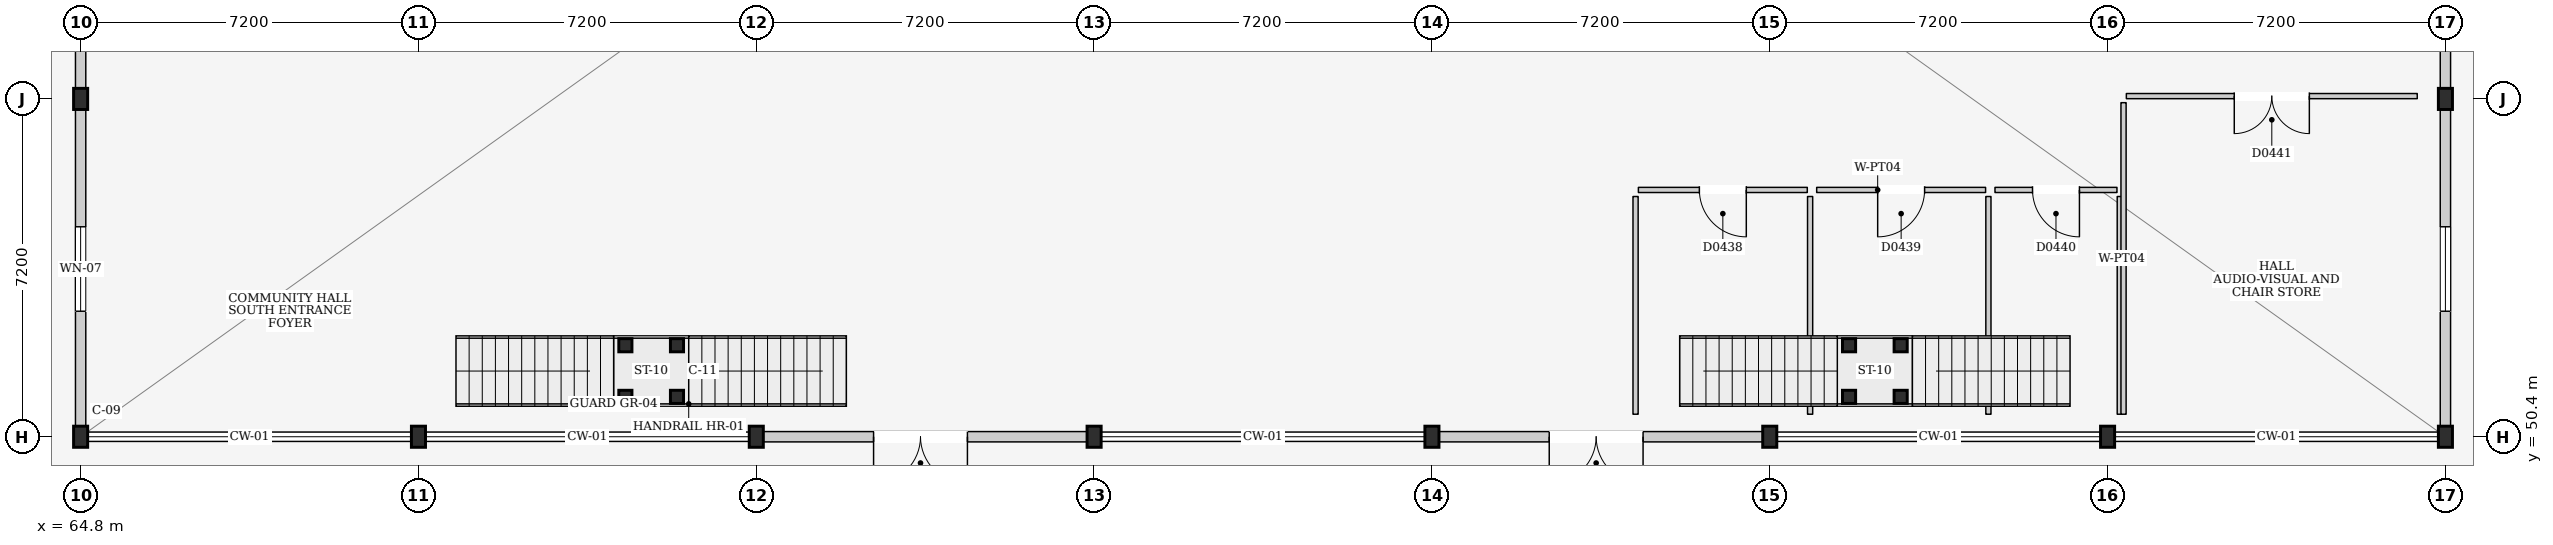
"""IFC4 building model, lengths in metres.
Left out: names, types, materials, properties, quantities, classifications, styles, units other than length and angle.
Written with IfcOpenShell. Run it as: python <this file> out.ifc"""

import sys

from ifc_helpers import new_model, si_unit, direction, frame, frame_2d, origin, origin_2d, place, context, subcontext, project, spatial, rectangle, i_section, extrude, element, fill, save


model = new_model("IFC4")
c1 = context("Model", 3, precision=1e-05, world=origin(), true_north=direction((0.0, 1.0)))
c2 = subcontext(c1, "Body", "Model", "MODEL_VIEW")
j1 = project(units=[si_unit("LENGTHUNIT", "METRE"), si_unit("PLANEANGLEUNIT", "RADIAN")], contexts=[c1])
p1 = place(None, origin())
s1 = spatial("IfcSite", under=j1, at=p1, CompositionType="ELEMENT")
p2 = place(p1, origin())
s2 = spatial("IfcBuilding", under=s1, at=p2, CompositionType="ELEMENT")
p3 = place(p2, origin())
s3 = spatial("IfcBuildingStorey", under=s2, at=p3, CompositionType="ELEMENT", Elevation=0.0)
for number, where, z_axis, x_axis in (
    (1, (64.8, 50.4, 0.0), (0.0, 0.0, 1.0), (1.0, 0.0, 0.0)),
    (2, (64.8, 57.6, 0.0), (0.0, 0.0, 1.0), (1.0, 0.0, 0.0)),
    (3, (72.0, 50.4, 0.0), (0.0, 0.0, 1.0), (1.0, 0.0, 0.0)),
    (4, (79.2, 50.4, 0.0), (0.0, 0.0, 1.0), (1.0, 0.0, 0.0)),
    (5, (86.4, 50.4, 0.0), (0.0, 0.0, 1.0), (1.0, 0.0, 0.0)),
    (6, (93.6, 50.4, 0.0), (0.0, 0.0, 1.0), (1.0, 0.0, 0.0)),
    (7, (100.8, 50.4, 0.0), (0.0, 0.0, 1.0), (1.0, 0.0, 0.0)),
    (8, (108.0, 50.4, 0.0), (0.0, 0.0, 1.0), (1.0, 0.0, 0.0)),
    (9, (115.2, 50.4, 0.0), (0.0, 0.0, 1.0), (1.0, 0.0, 0.0)),
    (10, (115.2, 57.6, 0.0), (0.0, 0.0, 1.0), (1.0, 0.0, 0.0)),
):
    element("IfcColumn", number, at=place(p3, frame(where, z_axis=z_axis, x_axis=x_axis)), inside=s3, PredefinedType="COLUMN", context=c2, shape_type="SweptSolid", body=[
        extrude(i_section(OverallWidth=0.3, OverallDepth=0.45, WebThickness=0.014, FlangeThickness=0.026, at=origin_2d()), origin(), (0.0, 0.0, 1.0), 4.5),
    ])
p4 = place(p3, frame((79.35, 50.4, 0.0), z_axis=(0.0, 0.0, 1.0), x_axis=(1.0, 0.0, 0.0)))
e11 = element("IfcWall", 11, at=p4, inside=s3, PredefinedType="ELEMENTEDWALL", context=c2, shape_type="SweptSolid", body=[
    extrude(rectangle(XDim=6.9, YDim=0.22, at=frame_2d((3.45, 0.0))), origin(), (0.0, 0.0, 1.0), 3.635),
])
p5 = place(p4, frame((2.35, 0.0, 0.0)))
e12 = element("IfcOpeningElement", 12, at=p5, cuts=e11, PredefinedType="OPENING", context=c2, shape_type="SweptSolid", body=[
    extrude(rectangle(XDim=2.0, YDim=2.5, at=frame_2d((1.0, 1.25))), frame((0.0, 0.125, 0.0), z_axis=(0.0, -1.0, 0.0), x_axis=(1.0, 0.0, 0.0)), (0.0, 0.0, 1.0), 0.25),
])
p6 = place(p3, frame((93.75, 50.4, 0.0), z_axis=(0.0, 0.0, 1.0), x_axis=(1.0, 0.0, 0.0)))
e13 = element("IfcWall", 13, at=p6, inside=s3, PredefinedType="ELEMENTEDWALL", context=c2, shape_type="SweptSolid", body=[
    extrude(rectangle(XDim=6.9, YDim=0.22, at=frame_2d((3.45, 0.0))), origin(), (0.0, 0.0, 1.0), 3.635),
])
p7 = place(p6, frame((2.35, 0.0, 0.0)))
e14 = element("IfcOpeningElement", 14, at=p7, cuts=e13, PredefinedType="OPENING", context=c2, shape_type="SweptSolid", body=[
    extrude(rectangle(XDim=2.0, YDim=2.5, at=frame_2d((1.0, 1.25))), frame((0.0, 0.125, 0.0), z_axis=(0.0, -1.0, 0.0), x_axis=(1.0, 0.0, 0.0)), (0.0, 0.0, 1.0), 0.25),
])
p8 = place(p3, frame((64.8, 50.625, 0.0), z_axis=(0.0, 0.0, 1.0), x_axis=(0.0, 1.0, 0.0)))
e15 = element("IfcWall", 15, at=p8, inside=s3, PredefinedType="ELEMENTEDWALL", context=c2, shape_type="SweptSolid", body=[
    extrude(rectangle(XDim=6.75, YDim=0.22, at=frame_2d((3.375, 0.0))), origin(), (0.0, 0.0, 1.0), 3.635),
])
p9 = place(p8, frame((2.45, 0.0, 0.95)))
e16 = element("IfcOpeningElement", 16, at=p9, cuts=e15, PredefinedType="OPENING", context=c2, shape_type="SweptSolid", body=[
    extrude(rectangle(XDim=1.8, YDim=1.8, at=frame_2d((0.9, 0.9))), frame((0.0, 0.125, 0.0), z_axis=(0.0, -1.0, 0.0), x_axis=(1.0, 0.0, 0.0)), (0.0, 0.0, 1.0), 0.25),
])
p10 = place(p3, frame((115.2, 50.625, 0.0), z_axis=(0.0, 0.0, 1.0), x_axis=(0.0, 1.0, 0.0)))
e17 = element("IfcWall", 17, at=p10, inside=s3, PredefinedType="ELEMENTEDWALL", context=c2, shape_type="SweptSolid", body=[
    extrude(rectangle(XDim=6.75, YDim=0.22, at=frame_2d((3.375, 0.0))), origin(), (0.0, 0.0, 1.0), 3.635),
])
p11 = place(p10, frame((2.45, 0.0, 0.95)))
e18 = element("IfcOpeningElement", 18, at=p11, cuts=e17, PredefinedType="OPENING", context=c2, shape_type="SweptSolid", body=[
    extrude(rectangle(XDim=1.8, YDim=1.8, at=frame_2d((0.9, 0.9))), frame((0.0, 0.125, 0.0), z_axis=(0.0, -1.0, 0.0), x_axis=(1.0, 0.0, 0.0)), (0.0, 0.0, 1.0), 0.25),
])
p12 = place(p3, frame((64.8, 57.825, 0.0), z_axis=(0.0, 0.0, 1.0), x_axis=(0.0, 1.0, 0.0)))
e19 = element("IfcWall", 19, at=p12, inside=s3, PredefinedType="ELEMENTEDWALL", context=c2, shape_type="SweptSolid", body=[
    extrude(rectangle(XDim=6.75, YDim=0.22, at=frame_2d((3.375, 0.0))), origin(), (0.0, 0.0, 1.0), 3.635),
])
p13 = place(p12, frame((2.45, 0.0, 0.95)))
e20 = element("IfcOpeningElement", 20, at=p13, cuts=e19, PredefinedType="OPENING", context=c2, shape_type="SweptSolid", body=[
    extrude(rectangle(XDim=1.8, YDim=1.8, at=frame_2d((0.9, 0.9))), frame((0.0, 0.125, 0.0), z_axis=(0.0, -1.0, 0.0), x_axis=(1.0, 0.0, 0.0)), (0.0, 0.0, 1.0), 0.25),
])
p14 = place(p3, frame((115.2, 57.825, 0.0), z_axis=(0.0, 0.0, 1.0), x_axis=(0.0, 1.0, 0.0)))
e21 = element("IfcWall", 21, at=p14, inside=s3, PredefinedType="ELEMENTEDWALL", context=c2, shape_type="SweptSolid", body=[
    extrude(rectangle(XDim=6.75, YDim=0.22, at=frame_2d((3.375, 0.0))), origin(), (0.0, 0.0, 1.0), 3.635),
])
p15 = place(p14, frame((2.45, 0.0, 0.95)))
e22 = element("IfcOpeningElement", 22, at=p15, cuts=e21, PredefinedType="OPENING", context=c2, shape_type="SweptSolid", body=[
    extrude(rectangle(XDim=1.8, YDim=1.8, at=frame_2d((0.9, 0.9))), frame((0.0, 0.125, 0.0), z_axis=(0.0, -1.0, 0.0), x_axis=(1.0, 0.0, 0.0)), (0.0, 0.0, 1.0), 0.25),
])
for number, where, z_axis, x_axis in (
    (23, (76.41, 51.25, 0.0), (0.0, 0.0, 1.0), (1.0, 0.0, 0.0)),
    (24, (77.51, 51.25, 0.0), (0.0, 0.0, 1.0), (1.0, 0.0, 0.0)),
    (25, (76.41, 52.35, 0.0), (0.0, 0.0, 1.0), (1.0, 0.0, 0.0)),
    (26, (77.51, 52.35, 0.0), (0.0, 0.0, 1.0), (1.0, 0.0, 0.0)),
    (27, (102.49, 51.25, 0.0), (0.0, 0.0, 1.0), (1.0, 0.0, 0.0)),
    (28, (103.59, 51.25, 0.0), (0.0, 0.0, 1.0), (1.0, 0.0, 0.0)),
    (29, (102.49, 52.35, 0.0), (0.0, 0.0, 1.0), (1.0, 0.0, 0.0)),
    (30, (103.59, 52.35, 0.0), (0.0, 0.0, 1.0), (1.0, 0.0, 0.0)),
):
    element("IfcColumn", number, at=place(p3, frame(where, z_axis=z_axis, x_axis=x_axis)), inside=s3, PredefinedType="COLUMN", context=c2, shape_type="SweptSolid", body=[
        extrude(i_section(OverallWidth=0.28, OverallDepth=0.28, WebThickness=0.01, FlangeThickness=0.018, at=origin_2d()), origin(), (0.0, 0.0, 1.0), 2.05),
    ])
p16 = place(p3, frame((98.0, 55.66, 0.0), z_axis=(0.0, 0.0, 1.0), x_axis=(1.0, 0.0, 0.0)))
e31 = element("IfcWall", 31, at=p16, inside=s3, PredefinedType="PARTITIONING", context=c2, shape_type="SweptSolid", body=[
    extrude(rectangle(XDim=3.6, YDim=0.11, at=frame_2d((1.8, 0.0))), origin(), (0.0, 0.0, 1.0), 4.2),
])
p17 = place(p16, frame((1.3, 0.0, 0.0)))
e32 = element("IfcOpeningElement", 32, at=p17, cuts=e31, PredefinedType="OPENING", context=c2, shape_type="SweptSolid", body=[
    extrude(rectangle(XDim=1.0, YDim=2.1, at=frame_2d((0.5, 1.05))), frame((0.0, 0.07, 0.0), z_axis=(0.0, -1.0, 0.0), x_axis=(1.0, 0.0, 0.0)), (0.0, 0.0, 1.0), 0.14),
])
for number, where, z_axis, x_axis in (
    (33, (97.94, 50.88, 0.0), (0.0, 0.0, 1.0), (0.0, 1.0, 0.0)),
    (34, (101.66, 50.88, 0.0), (0.0, 0.0, 1.0), (0.0, 1.0, 0.0)),
):
    element("IfcWall", number, at=place(p3, frame(where, z_axis=z_axis, x_axis=x_axis)), inside=s3, PredefinedType="PARTITIONING", context=c2, shape_type="SweptSolid", body=[
        extrude(rectangle(XDim=4.64, YDim=0.11, at=frame_2d((2.32, 0.0))), origin(), (0.0, 0.0, 1.0), 4.2),
    ])
p18 = place(p3, frame((101.8, 55.66, 0.0), z_axis=(0.0, 0.0, 1.0), x_axis=(1.0, 0.0, 0.0)))
e35 = element("IfcWall", 35, at=p18, inside=s3, PredefinedType="PARTITIONING", context=c2, shape_type="SweptSolid", body=[
    extrude(rectangle(XDim=3.6, YDim=0.11, at=frame_2d((1.8, 0.0))), origin(), (0.0, 0.0, 1.0), 4.2),
])
p19 = place(p18, frame((1.3, 0.0, 0.0)))
e36 = element("IfcOpeningElement", 36, at=p19, cuts=e35, PredefinedType="OPENING", context=c2, shape_type="SweptSolid", body=[
    extrude(rectangle(XDim=1.0, YDim=2.1, at=frame_2d((0.5, 1.05))), frame((0.0, 0.07, 0.0), z_axis=(0.0, -1.0, 0.0), x_axis=(1.0, 0.0, 0.0)), (0.0, 0.0, 1.0), 0.14),
])
p20 = place(p3, frame((105.46, 50.88, 0.0), z_axis=(0.0, 0.0, 1.0), x_axis=(0.0, 1.0, 0.0)))
e37 = element("IfcWall", 37, at=p20, inside=s3, PredefinedType="PARTITIONING", context=c2, shape_type="SweptSolid", body=[
    extrude(rectangle(XDim=4.64, YDim=0.11, at=frame_2d((2.32, 0.0))), origin(), (0.0, 0.0, 1.0), 4.2),
])
p21 = place(p3, frame((105.6, 55.66, 0.0), z_axis=(0.0, 0.0, 1.0), x_axis=(1.0, 0.0, 0.0)))
e38 = element("IfcWall", 38, at=p21, inside=s3, PredefinedType="PARTITIONING", context=c2, shape_type="SweptSolid", body=[
    extrude(rectangle(XDim=2.6, YDim=0.11, at=frame_2d((1.3, 0.0))), origin(), (0.0, 0.0, 1.0), 4.2),
])
p22 = place(p21, frame((0.8, 0.0, 0.0)))
e39 = element("IfcOpeningElement", 39, at=p22, cuts=e38, PredefinedType="OPENING", context=c2, shape_type="SweptSolid", body=[
    extrude(rectangle(XDim=1.0, YDim=2.1, at=frame_2d((0.5, 1.05))), frame((0.0, 0.07, 0.0), z_axis=(0.0, -1.0, 0.0), x_axis=(1.0, 0.0, 0.0)), (0.0, 0.0, 1.0), 0.14),
])
p23 = place(p3, frame((108.26, 50.88, 0.0), z_axis=(0.0, 0.0, 1.0), x_axis=(0.0, 1.0, 0.0)))
e40 = element("IfcWall", 40, at=p23, inside=s3, PredefinedType="PARTITIONING", context=c2, shape_type="SweptSolid", body=[
    extrude(rectangle(XDim=4.64, YDim=0.11, at=frame_2d((2.32, 0.0))), origin(), (0.0, 0.0, 1.0), 4.2),
])
p24 = place(p3, frame((108.4, 57.66, 0.0), z_axis=(0.0, 0.0, 1.0), x_axis=(1.0, 0.0, 0.0)))
e41 = element("IfcWall", 41, at=p24, inside=s3, PredefinedType="PARTITIONING", context=c2, shape_type="SweptSolid", body=[
    extrude(rectangle(XDim=6.2, YDim=0.11, at=frame_2d((3.1, 0.0))), origin(), (0.0, 0.0, 1.0), 4.2),
])
p25 = place(p24, frame((2.3, 0.0, 0.0)))
e42 = element("IfcOpeningElement", 42, at=p25, cuts=e41, PredefinedType="OPENING", context=c2, shape_type="SweptSolid", body=[
    extrude(rectangle(XDim=1.6, YDim=2.35, at=frame_2d((0.8, 1.175))), frame((0.0, 0.07, 0.0), z_axis=(0.0, -1.0, 0.0), x_axis=(1.0, 0.0, 0.0)), (0.0, 0.0, 1.0), 0.14),
])
p26 = place(p3, frame((108.34, 50.88, 0.0), z_axis=(0.0, 0.0, 1.0), x_axis=(0.0, 1.0, 0.0)))
e43 = element("IfcWall", 43, at=p26, inside=s3, PredefinedType="PARTITIONING", context=c2, shape_type="SweptSolid", body=[
    extrude(rectangle(XDim=6.64, YDim=0.11, at=frame_2d((3.32, 0.0))), origin(), (0.0, 0.0, 1.0), 4.2),
])
p27 = place(p5, frame((2.0, 0.0, 0.0), z_axis=(0.0, 0.0, 1.0), x_axis=(-1.0, 0.0, 0.0)))
e44 = element("IfcDoor", 44, at=p27, inside=s3, OperationType="DOUBLE_DOOR_SINGLE_SWING", PredefinedType="DOOR", context=c2, shape_type="SweptSolid", body=[
    extrude(rectangle(XDim=2.0, YDim=2.5, at=frame_2d((1.0, 1.25))), frame((0.0, 0.025, 0.0), z_axis=(0.0, -1.0, 0.0), x_axis=(1.0, 0.0, 0.0)), (0.0, 0.0, 1.0), 0.05),
])
fill(e12, e44)
p28 = place(p7, frame((2.0, 0.0, 0.0), z_axis=(0.0, 0.0, 1.0), x_axis=(-1.0, 0.0, 0.0)))
e45 = element("IfcDoor", 45, at=p28, inside=s3, OperationType="DOUBLE_DOOR_SINGLE_SWING", PredefinedType="DOOR", context=c2, shape_type="SweptSolid", body=[
    extrude(rectangle(XDim=2.0, YDim=2.5, at=frame_2d((1.0, 1.25))), frame((0.0, 0.025, 0.0), z_axis=(0.0, -1.0, 0.0), x_axis=(1.0, 0.0, 0.0)), (0.0, 0.0, 1.0), 0.05),
])
fill(e14, e45)
p29 = place(p9, origin())
e46 = element("IfcWindow", 46, at=p29, inside=s3, PartitioningType="DOUBLE_PANEL_VERTICAL", PredefinedType="WINDOW", context=c2, shape_type="SweptSolid", body=[
    extrude(rectangle(XDim=1.8, YDim=1.8, at=frame_2d((0.9, 0.9))), frame((0.0, 0.03, 0.0), z_axis=(0.0, -1.0, 0.0), x_axis=(1.0, 0.0, 0.0)), (0.0, 0.0, 1.0), 0.06),
])
fill(e16, e46)
p30 = place(p11, origin())
e47 = element("IfcWindow", 47, at=p30, inside=s3, PartitioningType="DOUBLE_PANEL_VERTICAL", PredefinedType="WINDOW", context=c2, shape_type="SweptSolid", body=[
    extrude(rectangle(XDim=1.8, YDim=1.8, at=frame_2d((0.9, 0.9))), frame((0.0, 0.03, 0.0), z_axis=(0.0, -1.0, 0.0), x_axis=(1.0, 0.0, 0.0)), (0.0, 0.0, 1.0), 0.06),
])
fill(e18, e47)
p31 = place(p17, frame((1.0, 0.0, 0.0), z_axis=(0.0, 0.0, 1.0), x_axis=(-1.0, 0.0, 0.0)))
e48 = element("IfcDoor", 48, at=p31, inside=s3, OperationType="SINGLE_SWING_LEFT", PredefinedType="DOOR", context=c2, shape_type="SweptSolid", body=[
    extrude(rectangle(XDim=1.0, YDim=2.1, at=frame_2d((0.5, 1.05))), frame((0.0, 0.025, 0.0), z_axis=(0.0, -1.0, 0.0), x_axis=(1.0, 0.0, 0.0)), (0.0, 0.0, 1.0), 0.05),
])
fill(e32, e48)
p32 = place(p19, frame((1.0, 0.0, 0.0), z_axis=(0.0, 0.0, 1.0), x_axis=(-1.0, 0.0, 0.0)))
e49 = element("IfcDoor", 49, at=p32, inside=s3, OperationType="SINGLE_SWING_RIGHT", PredefinedType="DOOR", context=c2, shape_type="SweptSolid", body=[
    extrude(rectangle(XDim=1.0, YDim=2.1, at=frame_2d((0.5, 1.05))), frame((0.0, 0.025, 0.0), z_axis=(0.0, -1.0, 0.0), x_axis=(1.0, 0.0, 0.0)), (0.0, 0.0, 1.0), 0.05),
])
fill(e36, e49)
p33 = place(p22, frame((1.0, 0.0, 0.0), z_axis=(0.0, 0.0, 1.0), x_axis=(-1.0, 0.0, 0.0)))
e50 = element("IfcDoor", 50, at=p33, inside=s3, OperationType="SINGLE_SWING_LEFT", PredefinedType="DOOR", context=c2, shape_type="SweptSolid", body=[
    extrude(rectangle(XDim=1.0, YDim=2.1, at=frame_2d((0.5, 1.05))), frame((0.0, 0.025, 0.0), z_axis=(0.0, -1.0, 0.0), x_axis=(1.0, 0.0, 0.0)), (0.0, 0.0, 1.0), 0.05),
])
fill(e39, e50)
p34 = place(p25, frame((1.6, 0.0, 0.0), z_axis=(0.0, 0.0, 1.0), x_axis=(-1.0, 0.0, 0.0)))
e51 = element("IfcDoor", 51, at=p34, inside=s3, OperationType="DOUBLE_DOOR_SINGLE_SWING", PredefinedType="DOOR", context=c2, shape_type="SweptSolid", body=[
    extrude(rectangle(XDim=1.6, YDim=2.35, at=frame_2d((0.8, 1.175))), frame((0.0, 0.025, 0.0), z_axis=(0.0, -1.0, 0.0), x_axis=(1.0, 0.0, 0.0)), (0.0, 0.0, 1.0), 0.05),
])
fill(e42, e51)
save(model, sys.argv[1])
